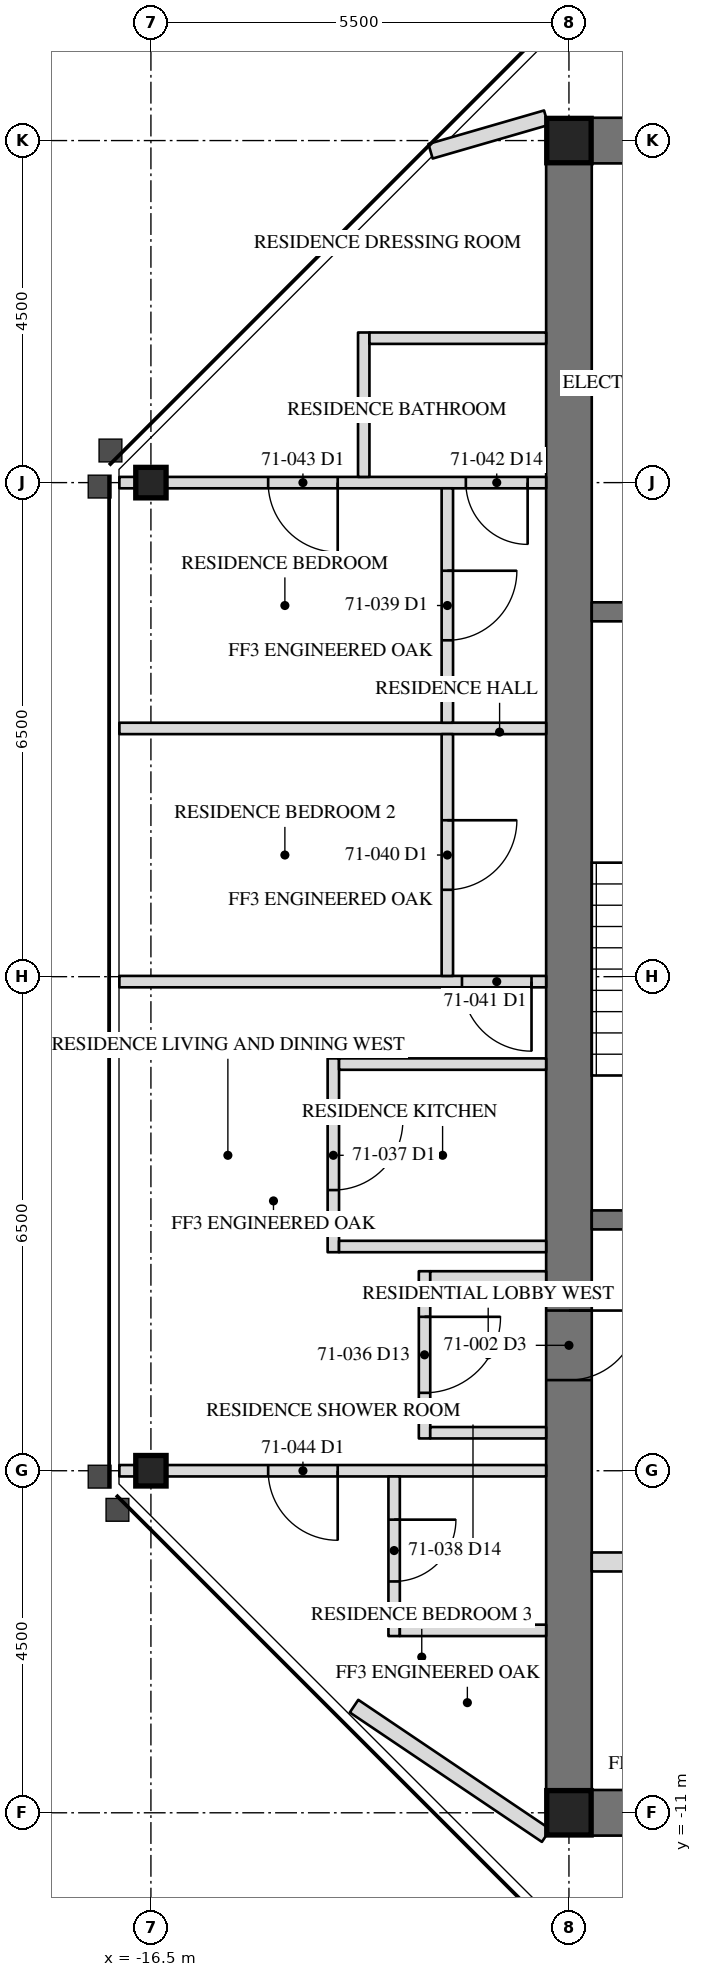
"""IFC4 building model, lengths in metres.
Left out: names, types, materials, properties, quantities, classifications, styles, units other than length and angle.
Written with IfcOpenShell. Run it as: python <this file> out.ifc"""

import sys

from ifc_helpers import new_model, si_unit, direction, frame, frame_2d, origin, origin_2d, place, context, subcontext, project, spatial, rectangle, hollow_rectangle, i_section, extrude, element, fill, save


model = new_model("IFC4")
c1 = context("Model", 3, precision=1e-05, world=origin(), true_north=direction((0.0, 1.0)))
c2 = subcontext(c1, "Body", "Model", "MODEL_VIEW")
j1 = project(units=[si_unit("LENGTHUNIT", "METRE"), si_unit("PLANEANGLEUNIT", "RADIAN")], contexts=[c1])
p1 = place(None, origin())
s1 = spatial("IfcSite", under=j1, at=p1, CompositionType="ELEMENT")
p2 = place(p1, origin())
s2 = spatial("IfcBuilding", under=s1, at=p2, CompositionType="ELEMENT")
p3 = place(p2, frame((0.0, 0.0, 288.4)))
s3 = spatial("IfcBuildingStorey", under=s2, at=p3, CompositionType="ELEMENT", Elevation=288.4)
for number, where, z_axis, x_axis in (
    (1, (-16.5, -6.5, 0.0), (0.0, 0.0, 1.0), (0.0, 1.0, 0.0)),
    (2, (-16.5, 6.5, 0.0), (0.0, 0.0, 1.0), (0.0, 1.0, 0.0)),
):
    element("IfcColumn", number, at=place(p3, frame(where, z_axis=z_axis, x_axis=x_axis)), inside=s3, PredefinedType="COLUMN", context=c2, shape_type="SweptSolid", body=[
        extrude(i_section(OverallWidth=0.401, OverallDepth=0.399, WebThickness=0.025, FlangeThickness=0.04, at=origin_2d()), origin(), (0.0, 0.0, 1.0), 3.6),
    ])
p4 = place(p3, frame((-11.0, 11.0, 0.0), z_axis=(0.0, 0.0, 1.0), x_axis=(0.0, -1.0, 0.0)))
e3 = element("IfcWall", 3, at=p4, inside=s3, PredefinedType="SHEAR", context=c2, shape_type="SweptSolid", body=[
    extrude(rectangle(XDim=22.0, YDim=0.6, at=frame_2d((11.0, 0.0))), origin(), (0.0, 0.0, 1.0), 3.6),
])
p5 = place(p4, frame((15.393, 0.0, 0.0)))
e4 = element("IfcOpeningElement", 4, at=p5, cuts=e3, PredefinedType="OPENING", context=c2, shape_type="SweptSolid", body=[
    extrude(rectangle(XDim=0.915, YDim=2.134, at=frame_2d((0.458, 1.067))), frame((0.0, 0.31, 0.0), z_axis=(0.0, -1.0, 0.0), x_axis=(1.0, 0.0, 0.0)), (0.0, 0.0, 1.0), 0.62),
])
for number, where, z_axis, x_axis in (
    (5, (-6.5, 11.0, 0.0), (0.0, 0.0, 1.0), (-1.0, 0.0, 0.0)),
    (6, (-11.0, -11.0, 0.0), (0.0, 0.0, 1.0), (1.0, 0.0, 0.0)),
):
    element("IfcWall", number, at=place(p3, frame(where, z_axis=z_axis, x_axis=x_axis)), inside=s3, PredefinedType="SHEAR", context=c2, shape_type="SweptSolid", body=[
        extrude(rectangle(XDim=4.5, YDim=0.6, at=frame_2d((2.25, 0.0))), origin(), (0.0, 0.0, 1.0), 3.6),
    ])
for number, where, z_axis, x_axis in (
    (7, (-11.0, 11.0, 0.0), (0.0, 0.0, 1.0), (1.0, 0.0, 0.0)),
    (8, (-11.0, -11.0, 0.0), (0.0, 0.0, 1.0), (1.0, 0.0, 0.0)),
):
    element("IfcColumn", number, at=place(p3, frame(where, z_axis=z_axis, x_axis=x_axis)), inside=s3, PredefinedType="COLUMN", context=c2, shape_type="SweptSolid", body=[
        extrude(hollow_rectangle(XDim=0.584, YDim=0.584, WallThickness=0.051, at=origin_2d()), origin(), (0.0, 0.0, 1.0), 3.6),
    ])
p6 = place(p3, frame((-6.95, 4.8, 0.0), z_axis=(0.0, 0.0, 1.0), x_axis=(-1.0, 0.0, 0.0)))
e9 = element("IfcWall", 9, at=p6, inside=s3, PredefinedType="SOLIDWALL", context=c2, shape_type="SweptSolid", body=[
    extrude(rectangle(XDim=3.75, YDim=0.25, at=frame_2d((1.875, 0.0))), origin(), (0.0, 0.0, 1.0), 3.41),
])
p7 = place(p3, frame((-6.95, -3.2, 0.0), z_axis=(0.0, 0.0, 1.0), x_axis=(-1.0, 0.0, 0.0)))
e10 = element("IfcWall", 10, at=p7, inside=s3, PredefinedType="SOLIDWALL", context=c2, shape_type="SweptSolid", body=[
    extrude(rectangle(XDim=3.75, YDim=0.25, at=frame_2d((1.875, 0.0))), origin(), (0.0, 0.0, 1.0), 3.41),
])
p8 = place(p7, frame((1.342, 0.0, 0.0)))
e11 = element("IfcOpeningElement", 11, at=p8, cuts=e10, PredefinedType="OPENING", context=c2, shape_type="SweptSolid", body=[
    extrude(rectangle(XDim=1.067, YDim=2.134, at=frame_2d((0.533, 1.067))), frame((0.0, 0.135, 0.0), z_axis=(0.0, -1.0, 0.0), x_axis=(1.0, 0.0, 0.0)), (0.0, 0.0, 1.0), 0.27),
])
p9 = place(p3, frame((-6.95, -7.7, 0.0), z_axis=(0.0, 0.0, 1.0), x_axis=(-1.0, 0.0, 0.0)))
e12 = element("IfcWall", 12, at=p9, inside=s3, PredefinedType="PARTITIONING", context=c2, shape_type="SweptSolid", body=[
    extrude(rectangle(XDim=3.75, YDim=0.25, at=frame_2d((1.875, 0.0))), origin(), (0.0, 0.0, 1.0), 3.41),
])
p10 = place(p9, frame((0.45, 0.0, 0.0)))
e13 = element("IfcOpeningElement", 13, at=p10, cuts=e12, PredefinedType="OPENING", context=c2, shape_type="SweptSolid", body=[
    extrude(rectangle(XDim=1.219, YDim=2.134, at=frame_2d((0.609, 1.067))), frame((0.0, 0.135, 0.0), z_axis=(0.0, -1.0, 0.0), x_axis=(1.0, 0.0, 0.0)), (0.0, 0.0, 1.0), 0.27),
])
p11 = place(p3, frame((-11.3, 11.3, 0.0), z_axis=(0.0, 0.0, 1.0), x_axis=(-0.960552344683, -0.278099250491, 0.0)))
e14 = element("IfcWall", 14, at=p11, inside=s3, PredefinedType="PARTITIONING", context=c2, shape_type="SweptSolid", body=[
    extrude(rectangle(XDim=1.584, YDim=0.2, at=frame_2d((0.792, 0.0))), origin(), (0.0, 0.0, 1.0), 3.41),
])
p12 = place(p3, frame((-11.3, -11.3, 0.0), z_axis=(0.0, 0.0, 1.0), x_axis=(-0.829279340477, 0.558834300538, 0.0)))
e15 = element("IfcWall", 15, at=p12, inside=s3, PredefinedType="PARTITIONING", context=c2, shape_type="SweptSolid", body=[
    extrude(rectangle(XDim=3.048, YDim=0.2, at=frame_2d((1.524, 0.0))), origin(), (0.0, 0.0, 1.0), 2.704),
])
p13 = place(p3, frame((-11.3, 6.5, 0.0), z_axis=(0.0, 0.0, 1.0), x_axis=(-1.0, 0.0, 0.0)))
e16 = element("IfcWall", 16, at=p13, inside=s3, PredefinedType="PARTITIONING", context=c2, shape_type="SweptSolid", body=[
    extrude(rectangle(XDim=5.615, YDim=0.15, at=frame_2d((2.808, 0.0))), origin(), (0.0, 0.0, 1.0), 2.966),
])
p14 = place(p13, frame((0.243, 0.0, 0.0)))
e17 = element("IfcOpeningElement", 17, at=p14, cuts=e16, PredefinedType="OPENING", context=c2, shape_type="SweptSolid", body=[
    extrude(rectangle(XDim=0.813, YDim=2.032, at=frame_2d((0.406, 1.016))), frame((0.0, 0.085, 0.0), z_axis=(0.0, -1.0, 0.0), x_axis=(1.0, 0.0, 0.0)), (0.0, 0.0, 1.0), 0.17),
])
p15 = place(p13, frame((2.742, 0.0, 0.0)))
e18 = element("IfcOpeningElement", 18, at=p15, cuts=e16, PredefinedType="OPENING", context=c2, shape_type="SweptSolid", body=[
    extrude(rectangle(XDim=0.915, YDim=2.134, at=frame_2d((0.458, 1.067))), frame((0.0, 0.085, 0.0), z_axis=(0.0, -1.0, 0.0), x_axis=(1.0, 0.0, 0.0)), (0.0, 0.0, 1.0), 0.17),
])
p16 = place(p3, frame((-11.3, 3.266, 0.0), z_axis=(0.0, 0.0, 1.0), x_axis=(-1.0, 0.0, 0.0)))
e19 = element("IfcWall", 19, at=p16, inside=s3, PredefinedType="PARTITIONING", context=c2, shape_type="SweptSolid", body=[
    extrude(rectangle(XDim=5.615, YDim=0.15, at=frame_2d((2.808, 0.0))), origin(), (0.0, 0.0, 1.0), 2.709),
])
p17 = place(p3, frame((-11.3, -0.065, 0.0), z_axis=(0.0, 0.0, 1.0), x_axis=(-1.0, 0.0, 0.0)))
e20 = element("IfcWall", 20, at=p17, inside=s3, PredefinedType="PARTITIONING", context=c2, shape_type="SweptSolid", body=[
    extrude(rectangle(XDim=5.615, YDim=0.15, at=frame_2d((2.808, 0.0))), origin(), (0.0, 0.0, 1.0), 2.709),
])
p18 = place(p17, frame((0.192, 0.0, 0.0)))
e21 = element("IfcOpeningElement", 21, at=p18, cuts=e20, PredefinedType="OPENING", context=c2, shape_type="SweptSolid", body=[
    extrude(rectangle(XDim=0.915, YDim=2.134, at=frame_2d((0.458, 1.067))), frame((0.0, 0.085, 0.0), z_axis=(0.0, -1.0, 0.0), x_axis=(1.0, 0.0, 0.0)), (0.0, 0.0, 1.0), 0.17),
])
p19 = place(p3, frame((-11.3, -6.5, 0.0), z_axis=(0.0, 0.0, 1.0), x_axis=(-1.0, 0.0, 0.0)))
e22 = element("IfcWall", 22, at=p19, inside=s3, PredefinedType="PARTITIONING", context=c2, shape_type="SweptSolid", body=[
    extrude(rectangle(XDim=5.615, YDim=0.15, at=frame_2d((2.808, 0.0))), origin(), (0.0, 0.0, 1.0), 2.966),
])
p20 = place(p19, frame((2.742, 0.0, 0.0)))
e23 = element("IfcOpeningElement", 23, at=p20, cuts=e22, PredefinedType="OPENING", context=c2, shape_type="SweptSolid", body=[
    extrude(rectangle(XDim=0.915, YDim=2.134, at=frame_2d((0.458, 1.067))), frame((0.0, 0.085, 0.0), z_axis=(0.0, -1.0, 0.0), x_axis=(1.0, 0.0, 0.0)), (0.0, 0.0, 1.0), 0.17),
])
p21 = place(p3, frame((-12.9, -3.875, 0.0), z_axis=(0.0, 0.0, 1.0), x_axis=(0.0, -1.0, 0.0)))
e24 = element("IfcWall", 24, at=p21, inside=s3, PredefinedType="PARTITIONING", context=c2, shape_type="SweptSolid", body=[
    extrude(rectangle(XDim=2.2, YDim=0.15, at=frame_2d((1.1, 0.0))), origin(), (0.0, 0.0, 1.0), 3.41),
])
p22 = place(p21, frame((0.6, 0.0, 0.0)))
e25 = element("IfcOpeningElement", 25, at=p22, cuts=e24, PredefinedType="OPENING", context=c2, shape_type="SweptSolid", body=[
    extrude(rectangle(XDim=1.0, YDim=2.134, at=frame_2d((0.5, 1.067))), frame((0.0, 0.085, 0.0), z_axis=(0.0, -1.0, 0.0), x_axis=(1.0, 0.0, 0.0)), (0.0, 0.0, 1.0), 0.17),
])
for number, where, z_axis, x_axis in (
    (26, (-11.3, -3.95, 0.0), (0.0, 0.0, 1.0), (-1.0, 0.0, 0.0)),
    (27, (-11.3, -6.0, 0.0), (0.0, 0.0, 1.0), (-1.0, 0.0, 0.0)),
):
    element("IfcWall", number, at=place(p3, frame(where, z_axis=z_axis, x_axis=x_axis)), inside=s3, PredefinedType="PARTITIONING", context=c2, shape_type="SweptSolid", body=[
        extrude(rectangle(XDim=1.525, YDim=0.15, at=frame_2d((0.762, 0.0))), origin(), (0.0, 0.0, 1.0), 3.41),
    ])
p23 = place(p3, frame((-14.1, -1.075, 0.0), z_axis=(0.0, 0.0, 1.0), x_axis=(0.0, -1.0, 0.0)))
e28 = element("IfcWall", 28, at=p23, inside=s3, PredefinedType="PARTITIONING", context=c2, shape_type="SweptSolid", body=[
    extrude(rectangle(XDim=2.55, YDim=0.15, at=frame_2d((1.275, 0.0))), origin(), (0.0, 0.0, 1.0), 3.41),
])
p24 = place(p23, frame((0.817, 0.0, 0.0)))
e29 = element("IfcOpeningElement", 29, at=p24, cuts=e28, PredefinedType="OPENING", context=c2, shape_type="SweptSolid", body=[
    extrude(rectangle(XDim=0.915, YDim=2.134, at=frame_2d((0.458, 1.067))), frame((0.0, 0.085, 0.0), z_axis=(0.0, -1.0, 0.0), x_axis=(1.0, 0.0, 0.0)), (0.0, 0.0, 1.0), 0.17),
])
for number, where, z_axis, x_axis in (
    (30, (-11.3, -1.15, 0.0), (0.0, 0.0, 1.0), (-1.0, 0.0, 0.0)),
    (31, (-11.3, -3.55, 0.0), (0.0, 0.0, 1.0), (-1.0, 0.0, 0.0)),
):
    element("IfcWall", number, at=place(p3, frame(where, z_axis=z_axis, x_axis=x_axis)), inside=s3, PredefinedType="PARTITIONING", context=c2, shape_type="SweptSolid", body=[
        extrude(rectangle(XDim=2.725, YDim=0.15, at=frame_2d((1.362, 0.0))), origin(), (0.0, 0.0, 1.0), 3.41),
    ])
p25 = place(p3, frame((-13.3, -6.575, 0.0), z_axis=(0.0, 0.0, 1.0), x_axis=(0.0, -1.0, 0.0)))
e32 = element("IfcWall", 32, at=p25, inside=s3, PredefinedType="PARTITIONING", context=c2, shape_type="SweptSolid", body=[
    extrude(rectangle(XDim=2.1, YDim=0.15, at=frame_2d((1.05, 0.0))), origin(), (0.0, 0.0, 1.0), 3.41),
])
p26 = place(p25, frame((0.569, 0.0, 0.0)))
e33 = element("IfcOpeningElement", 33, at=p26, cuts=e32, PredefinedType="OPENING", context=c2, shape_type="SweptSolid", body=[
    extrude(rectangle(XDim=0.813, YDim=2.032, at=frame_2d((0.406, 1.016))), frame((0.0, 0.085, 0.0), z_axis=(0.0, -1.0, 0.0), x_axis=(1.0, 0.0, 0.0)), (0.0, 0.0, 1.0), 0.17),
])
p27 = place(p3, frame((-11.3, -8.6, 0.0), z_axis=(0.0, 0.0, 1.0), x_axis=(-1.0, 0.0, 0.0)))
e34 = element("IfcWall", 34, at=p27, inside=s3, PredefinedType="PARTITIONING", context=c2, shape_type="SweptSolid", body=[
    extrude(rectangle(XDim=1.925, YDim=0.15, at=frame_2d((0.962, 0.0))), origin(), (0.0, 0.0, 1.0), 3.41),
])
p28 = place(p3, frame((-12.6, 6.425, 0.0), z_axis=(0.0, 0.0, 1.0), x_axis=(0.0, -1.0, 0.0)))
e35 = element("IfcWall", 35, at=p28, inside=s3, PredefinedType="PARTITIONING", context=c2, shape_type="SweptSolid", body=[
    extrude(rectangle(XDim=3.084, YDim=0.15, at=frame_2d((1.542, 0.0))), origin(), (0.0, 0.0, 1.0), 3.41),
])
p29 = place(p28, frame((1.084, 0.0, 0.0)))
e36 = element("IfcOpeningElement", 36, at=p29, cuts=e35, PredefinedType="OPENING", context=c2, shape_type="SweptSolid", body=[
    extrude(rectangle(XDim=0.915, YDim=2.134, at=frame_2d((0.458, 1.067))), frame((0.0, 0.085, 0.0), z_axis=(0.0, -1.0, 0.0), x_axis=(1.0, 0.0, 0.0)), (0.0, 0.0, 1.0), 0.17),
])
p30 = place(p3, frame((-12.6, 3.191, 0.0), z_axis=(0.0, 0.0, 1.0), x_axis=(0.0, -1.0, 0.0)))
e37 = element("IfcWall", 37, at=p30, inside=s3, PredefinedType="PARTITIONING", context=c2, shape_type="SweptSolid", body=[
    extrude(rectangle(XDim=3.181, YDim=0.15, at=frame_2d((1.59, 0.0))), origin(), (0.0, 0.0, 1.0), 3.41),
])
p31 = place(p30, frame((1.133, 0.0, 0.0)))
e38 = element("IfcOpeningElement", 38, at=p31, cuts=e37, PredefinedType="OPENING", context=c2, shape_type="SweptSolid", body=[
    extrude(rectangle(XDim=0.915, YDim=2.134, at=frame_2d((0.458, 1.067))), frame((0.0, 0.085, 0.0), z_axis=(0.0, -1.0, 0.0), x_axis=(1.0, 0.0, 0.0)), (0.0, 0.0, 1.0), 0.17),
])
p32 = place(p3, frame((-13.7, 6.575, 0.0), z_axis=(0.0, 0.0, 1.0), x_axis=(0.0, 1.0, 0.0)))
e39 = element("IfcWall", 39, at=p32, inside=s3, PredefinedType="PARTITIONING", context=c2, shape_type="SweptSolid", body=[
    extrude(rectangle(XDim=1.9, YDim=0.15, at=frame_2d((0.95, 0.0))), origin(), (0.0, 0.0, 1.0), 3.41),
])
p33 = place(p3, frame((-11.3, 8.4, 0.0), z_axis=(0.0, 0.0, 1.0), x_axis=(-1.0, 0.0, 0.0)))
e40 = element("IfcWall", 40, at=p33, inside=s3, PredefinedType="PARTITIONING", context=c2, shape_type="SweptSolid", body=[
    extrude(rectangle(XDim=2.325, YDim=0.15, at=frame_2d((1.163, 0.0))), origin(), (0.0, 0.0, 1.0), 3.41),
])
p34 = place(p5, origin())
e41 = element("IfcDoor", 41, at=p34, inside=s3, OperationType="SINGLE_SWING_RIGHT", PredefinedType="DOOR", context=c2, shape_type="SweptSolid", body=[
    extrude(rectangle(XDim=0.915, YDim=2.134, at=frame_2d((0.458, 1.067))), frame((0.0, -0.225, 0.0), z_axis=(0.0, -1.0, 0.0), x_axis=(1.0, 0.0, 0.0)), (0.0, 0.0, 1.0), 0.05),
])
fill(e4, e41)
p35 = place(p22, origin())
e42 = element("IfcDoor", 42, at=p35, inside=s3, OperationType="SINGLE_SWING_RIGHT", PredefinedType="DOOR", context=c2, shape_type="SweptSolid", body=[
    extrude(rectangle(XDim=1.0, YDim=2.134, at=frame_2d((0.5, 1.067))), frame((0.0, 0.025, 0.0), z_axis=(0.0, -1.0, 0.0), x_axis=(1.0, 0.0, 0.0)), (0.0, 0.0, 1.0), 0.05),
])
fill(e25, e42)
p36 = place(p24, origin())
e43 = element("IfcDoor", 43, at=p36, inside=s3, OperationType="SINGLE_SWING_LEFT", PredefinedType="DOOR", context=c2, shape_type="SweptSolid", body=[
    extrude(rectangle(XDim=0.915, YDim=2.134, at=frame_2d((0.458, 1.067))), frame((0.0, 0.025, 0.0), z_axis=(0.0, -1.0, 0.0), x_axis=(1.0, 0.0, 0.0)), (0.0, 0.0, 1.0), 0.05),
])
fill(e29, e43)
p37 = place(p26, origin())
e44 = element("IfcDoor", 44, at=p37, inside=s3, OperationType="SINGLE_SWING_LEFT", PredefinedType="DOOR", context=c2, shape_type="SweptSolid", body=[
    extrude(rectangle(XDim=0.813, YDim=2.032, at=frame_2d((0.406, 1.016))), frame((0.0, 0.025, 0.0), z_axis=(0.0, -1.0, 0.0), x_axis=(1.0, 0.0, 0.0)), (0.0, 0.0, 1.0), 0.05),
])
fill(e33, e44)
p38 = place(p29, origin())
e45 = element("IfcDoor", 45, at=p38, inside=s3, OperationType="SINGLE_SWING_LEFT", PredefinedType="DOOR", context=c2, shape_type="SweptSolid", body=[
    extrude(rectangle(XDim=0.915, YDim=2.134, at=frame_2d((0.458, 1.067))), frame((0.0, 0.025, 0.0), z_axis=(0.0, -1.0, 0.0), x_axis=(1.0, 0.0, 0.0)), (0.0, 0.0, 1.0), 0.05),
])
fill(e36, e45)
p39 = place(p31, origin())
e46 = element("IfcDoor", 46, at=p39, inside=s3, OperationType="SINGLE_SWING_LEFT", PredefinedType="DOOR", context=c2, shape_type="SweptSolid", body=[
    extrude(rectangle(XDim=0.915, YDim=2.134, at=frame_2d((0.458, 1.067))), frame((0.0, 0.025, 0.0), z_axis=(0.0, -1.0, 0.0), x_axis=(1.0, 0.0, 0.0)), (0.0, 0.0, 1.0), 0.05),
])
fill(e38, e46)
p40 = place(p18, origin())
e47 = element("IfcDoor", 47, at=p40, inside=s3, OperationType="SINGLE_SWING_LEFT", PredefinedType="DOOR", context=c2, shape_type="SweptSolid", body=[
    extrude(rectangle(XDim=0.915, YDim=2.134, at=frame_2d((0.458, 1.067))), frame((0.0, 0.025, 0.0), z_axis=(0.0, -1.0, 0.0), x_axis=(1.0, 0.0, 0.0)), (0.0, 0.0, 1.0), 0.05),
])
fill(e21, e47)
p41 = place(p14, origin())
e48 = element("IfcDoor", 48, at=p41, inside=s3, OperationType="SINGLE_SWING_LEFT", PredefinedType="DOOR", context=c2, shape_type="SweptSolid", body=[
    extrude(rectangle(XDim=0.813, YDim=2.032, at=frame_2d((0.406, 1.016))), frame((0.0, 0.025, 0.0), z_axis=(0.0, -1.0, 0.0), x_axis=(1.0, 0.0, 0.0)), (0.0, 0.0, 1.0), 0.05),
])
fill(e17, e48)
p42 = place(p15, origin())
e49 = element("IfcDoor", 49, at=p42, inside=s3, OperationType="SINGLE_SWING_LEFT", PredefinedType="DOOR", context=c2, shape_type="SweptSolid", body=[
    extrude(rectangle(XDim=0.915, YDim=2.134, at=frame_2d((0.458, 1.067))), frame((0.0, 0.025, 0.0), z_axis=(0.0, -1.0, 0.0), x_axis=(1.0, 0.0, 0.0)), (0.0, 0.0, 1.0), 0.05),
])
fill(e18, e49)
p43 = place(p20, origin())
e50 = element("IfcDoor", 50, at=p43, inside=s3, OperationType="SINGLE_SWING_LEFT", PredefinedType="DOOR", context=c2, shape_type="SweptSolid", body=[
    extrude(rectangle(XDim=0.915, YDim=2.134, at=frame_2d((0.458, 1.067))), frame((0.0, 0.025, 0.0), z_axis=(0.0, -1.0, 0.0), x_axis=(1.0, 0.0, 0.0)), (0.0, 0.0, 1.0), 0.05),
])
fill(e23, e50)
save(model, sys.argv[1])
